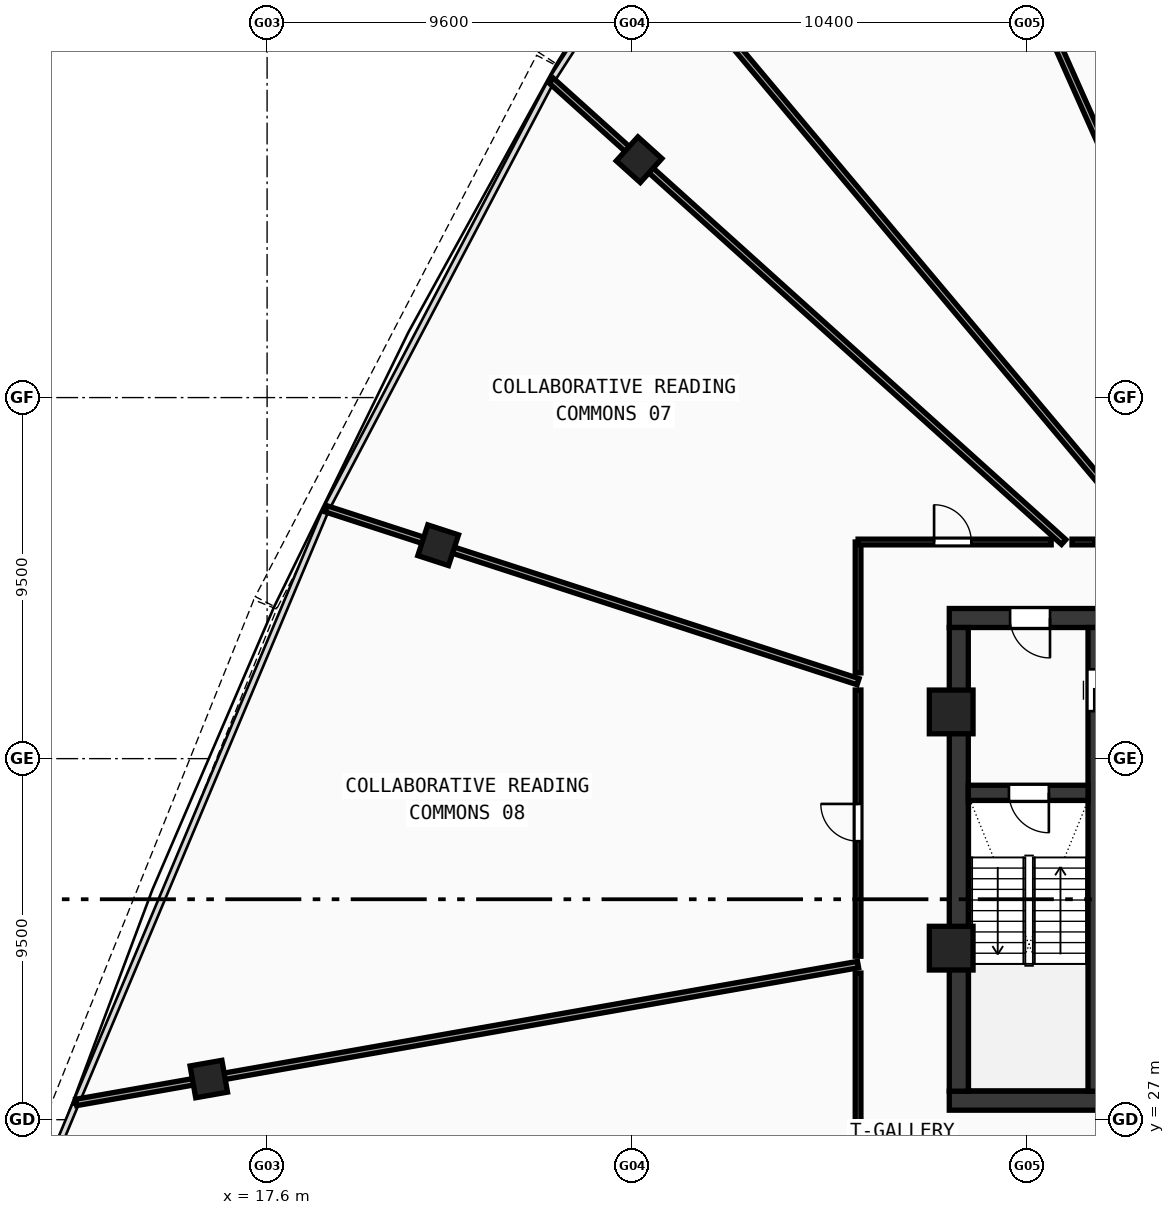
"""IFC4 building model, lengths in metres.
Left out: names, types, materials, properties, quantities, classifications, styles, units other than length and angle.
Written with IfcOpenShell. Run it as: python <this file> out.ifc"""

import sys

from ifc_helpers import new_model, si_unit, direction, frame, frame_2d, origin, origin_with_axes, origin_2d, place, context, subcontext, project, spatial, rectangle, hollow_rectangle, extrude, source, transform, mapped, element, fill, save


model = new_model("IFC4")
c1 = context("Model", 3, precision=1e-05, world=origin(), true_north=direction((0.0, 1.0)))
c2 = subcontext(c1, "Body", "Model", "MODEL_VIEW")
j1 = project(units=[si_unit("LENGTHUNIT", "METRE"), si_unit("PLANEANGLEUNIT", "RADIAN")], contexts=[c1])
p1 = place(None, origin())
s1 = spatial("IfcSite", under=j1, at=p1, CompositionType="ELEMENT")
p2 = place(p1, origin())
s2 = spatial("IfcBuilding", under=s1, at=p2, CompositionType="ELEMENT")
p3 = place(p2, frame((0.0, 0.0, 229.61)))
s3 = spatial("IfcBuildingStorey", under=s2, at=p3, CompositionType="ELEMENT", Elevation=229.61)
p4 = place(p3, frame((35.55, 27.5, 0.0), z_axis=(0.0, 0.0, 1.0), x_axis=(1.0, 0.0, 0.0)))
e1 = element("IfcWall", 1, at=p4, inside=s3, PredefinedType="SHEAR", context=c2, shape_type="SweptSolid", body=[
    extrude(rectangle(XDim=24.9, YDim=0.5, at=frame_2d((12.45, 0.0))), origin(), (0.0, 0.0, 1.0), 3.47),
])
p5 = place(p3, frame((35.55, 40.2, 0.0), z_axis=(0.0, 0.0, 1.0), x_axis=(1.0, 0.0, 0.0)))
e2 = element("IfcWall", 2, at=p5, inside=s3, PredefinedType="SHEAR", context=c2, shape_type="SweptSolid", body=[
    extrude(rectangle(XDim=11.25, YDim=0.5, at=frame_2d((5.625, 0.0))), origin(), (0.0, 0.0, 1.0), 3.47),
])
p6 = place(p5, frame((1.6, 0.0, 0.0)))
e3 = element("IfcOpeningElement", 3, at=p6, cuts=e2, PredefinedType="OPENING", context=c2, shape_type="SweptSolid", body=[
    extrude(rectangle(XDim=1.05, YDim=2.1, at=frame_2d((0.525, 1.05))), frame((0.0, 0.26, 0.0), z_axis=(0.0, -1.0, 0.0), x_axis=(1.0, 0.0, 0.0)), (0.0, 0.0, 1.0), 0.52),
])
p7 = place(p3, frame((35.8, 27.75, 0.0), z_axis=(0.0, 0.0, 1.0), x_axis=(0.0, 1.0, 0.0)))
e4 = element("IfcWall", 4, at=p7, inside=s3, PredefinedType="SHEAR", context=c2, shape_type="SweptSolid", body=[
    extrude(rectangle(XDim=12.2, YDim=0.5, at=frame_2d((6.1, 0.0))), origin(), (0.0, 0.0, 1.0), 3.47),
])
p8 = place(p3, frame((39.4, 27.75, 0.0), z_axis=(0.0, 0.0, 1.0), x_axis=(0.0, 1.0, 0.0)))
e5 = element("IfcWall", 5, at=p8, inside=s3, PredefinedType="SHEAR", context=c2, shape_type="SweptSolid", body=[
    extrude(rectangle(XDim=12.2, YDim=0.4, at=frame_2d((6.1, 0.0))), origin(), (0.0, 0.0, 1.0), 3.47),
])
p9 = place(p8, frame((10.0, 0.0, 0.0)))
e6 = element("IfcOpeningElement", 6, at=p9, cuts=e5, PredefinedType="OPENING", context=c2, shape_type="SweptSolid", body=[
    extrude(rectangle(XDim=1.1, YDim=2.1, at=frame_2d((0.55, 1.05))), frame((0.0, 0.21, 0.0), z_axis=(0.0, -1.0, 0.0), x_axis=(1.0, 0.0, 0.0)), (0.0, 0.0, 1.0), 0.42),
])
p10 = place(p3, frame((36.05, 35.6, 0.0), z_axis=(0.0, 0.0, 1.0), x_axis=(1.0, 0.0, 0.0)))
e7 = element("IfcWall", 7, at=p10, inside=s3, PredefinedType="SHEAR", context=c2, shape_type="SweptSolid", body=[
    extrude(rectangle(XDim=3.15, YDim=0.4, at=frame_2d((1.575, 0.0))), origin(), (0.0, 0.0, 1.0), 3.47),
])
p11 = place(p10, frame((1.07, 0.0, 0.0)))
e8 = element("IfcOpeningElement", 8, at=p11, cuts=e7, PredefinedType="OPENING", context=c2, shape_type="SweptSolid", body=[
    extrude(rectangle(XDim=1.05, YDim=2.1, at=frame_2d((0.525, 1.05))), frame((0.0, 0.21, 0.0), z_axis=(0.0, -1.0, 0.0), x_axis=(1.0, 0.0, 0.0)), (0.0, 0.0, 1.0), 0.42),
])
m1 = source(origin(), c2, "Body", "SweptSolid", [
    extrude(hollow_rectangle(XDim=1.15, YDim=1.15, WallThickness=0.048, at=origin_2d()), origin(), (0.0, 0.0, 1.0), 3.73),
])
for number, where, z_axis, x_axis in (
    (9, (35.6, 37.729, -0.26), (0.0, 0.0, 1.0), (1.0, 0.0, 0.0)),
    (10, (35.6, 31.513, -0.26), (0.0, 0.0, 1.0), (1.0, 0.0, 0.0)),
):
    element("IfcColumn", number, at=place(p3, frame(where, z_axis=z_axis, x_axis=x_axis)), inside=s3, PredefinedType="COLUMN", context=c2, shape_type="MappedRepresentation", body=[
        mapped(m1, transform((0.0, 0.0, 0.0), scale=1.0)),
    ])
m2 = source(origin(), c2, "Body", "SweptSolid", [
    extrude(hollow_rectangle(XDim=0.85, YDim=0.85, WallThickness=0.034, at=origin_2d()), origin(), (0.0, 0.0, 1.0), 3.73),
])
for number, where, z_axis, x_axis in (
    (11, (27.388, 52.259, -0.26), (0.0, 0.0, 1.0), (-0.669, -0.743, 0.0)),
    (12, (22.102, 42.115, -0.26), (0.0, 0.0, 1.0), (-0.309, -0.951, 0.0)),
    (13, (16.066, 28.069, -0.26), (0.0, 0.0, 1.0), (0.174, -0.985, 0.0)),
):
    element("IfcColumn", number, at=place(p3, frame(where, z_axis=z_axis, x_axis=x_axis)), inside=s3, PredefinedType="COLUMN", context=c2, shape_type="MappedRepresentation", body=[
        mapped(m2, transform((0.0, 0.0, 0.0), scale=1.0)),
    ])
p12 = place(p3, frame((42.702, 45.6, 0.0), z_axis=(0.0, 0.0, 1.0), x_axis=(-0.406743256781, 0.913542513003, 0.0)))
e14 = element("IfcWall", 14, at=p12, inside=s3, PredefinedType="PARTITIONING", context=c2, shape_type="SweptSolid", body=[
    extrude(rectangle(XDim=23.368, YDim=0.17, at=frame_2d((11.684, 0.0))), origin(), (0.0, 0.0, 1.0), 2.82),
])
p13 = place(p3, frame((39.6, 43.711, 0.0), z_axis=(0.0, 0.0, 1.0), x_axis=(-0.642791950905, 0.766040800383, 0.0)))
e15 = element("IfcWall", 15, at=p13, inside=s3, PredefinedType="PARTITIONING", context=c2, shape_type="SweptSolid", body=[
    extrude(rectangle(XDim=18.806, YDim=0.17, at=frame_2d((9.403, 0.0))), origin(), (0.0, 0.0, 1.0), 2.82),
])
p14 = place(p3, frame((38.56, 42.2, 0.0), z_axis=(0.0, 0.0, 1.0), x_axis=(-0.743147575456, 0.669127552185, 0.0)))
e16 = element("IfcWall", 16, at=p14, inside=s3, PredefinedType="PARTITIONING", context=c2, shape_type="SweptSolid", body=[
    extrude(rectangle(XDim=18.141, YDim=0.17, at=frame_2d((9.07, 0.0))), origin(), (0.0, 0.0, 1.0), 2.82),
])
p15 = place(p3, frame((33.15, 38.525, 0.0), z_axis=(0.0, 0.0, 1.0), x_axis=(-0.951058452106, 0.309011036497, 0.0)))
e17 = element("IfcWall", 17, at=p15, inside=s3, PredefinedType="PARTITIONING", context=c2, shape_type="SweptSolid", body=[
    extrude(rectangle(XDim=14.714, YDim=0.17, at=frame_2d((7.357, 0.0))), origin(), (0.0, 0.0, 1.0), 2.82),
])
p16 = place(p3, frame((33.15, 31.082, 0.0), z_axis=(0.0, 0.0, 1.0), x_axis=(-0.984808138799, -0.17364598975, 0.0)))
e18 = element("IfcWall", 18, at=p16, inside=s3, PredefinedType="PARTITIONING", context=c2, shape_type="SweptSolid", body=[
    extrude(rectangle(XDim=20.89, YDim=0.17, at=frame_2d((10.445, 0.0))), origin(), (0.0, 0.0, 1.0), 2.82),
])
p17 = place(p3, frame((33.15, 24.9, 0.0), z_axis=(0.0, 0.0, 1.0), x_axis=(0.0, 1.0, 0.0)))
e19 = element("IfcWall", 19, at=p17, inside=s3, PredefinedType="PARTITIONING", context=c2, shape_type="SweptSolid", body=[
    extrude(rectangle(XDim=5.958, YDim=0.15, at=frame_2d((2.979, 0.0))), origin(), (0.0, 0.0, 1.0), 3.12),
])
p18 = place(p3, frame((33.15, 31.301, 0.0), z_axis=(0.0, 0.0, 1.0), x_axis=(0.0, 1.0, 0.0)))
e20 = element("IfcWall", 20, at=p18, inside=s3, PredefinedType="PARTITIONING", context=c2, shape_type="SweptSolid", body=[
    extrude(rectangle(XDim=7.004, YDim=0.15, at=frame_2d((3.502, 0.0))), origin(), (0.0, 0.0, 1.0), 3.47),
])
p19 = place(p18, frame((3.027, 0.0, 0.0)))
e21 = element("IfcOpeningElement", 21, at=p19, cuts=e20, PredefinedType="OPENING", context=c2, shape_type="SweptSolid", body=[
    extrude(rectangle(XDim=0.98, YDim=2.12, at=frame_2d((0.49, 1.06))), frame((0.0, 0.085, 0.0), z_axis=(0.0, -1.0, 0.0), x_axis=(1.0, 0.0, 0.0)), (0.0, 0.0, 1.0), 0.17),
])
p20 = place(p3, frame((33.15, 38.756, 0.0), z_axis=(0.0, 0.0, 1.0), x_axis=(0.0, 1.0, 0.0)))
e22 = element("IfcWall", 22, at=p20, inside=s3, PredefinedType="PARTITIONING", context=c2, shape_type="SweptSolid", body=[
    extrude(rectangle(XDim=3.444, YDim=0.15, at=frame_2d((1.722, 0.0))), origin(), (0.0, 0.0, 1.0), 3.12),
])
p21 = place(p3, frame((33.15, 42.2, 0.0), z_axis=(0.0, 0.0, 1.0), x_axis=(1.0, 0.0, 0.0)))
e23 = element("IfcWall", 23, at=p21, inside=s3, PredefinedType="PARTITIONING", context=c2, shape_type="SweptSolid", body=[
    extrude(rectangle(XDim=5.081, YDim=0.15, at=frame_2d((2.541, 0.0))), origin(), (0.0, 0.0, 1.0), 3.12),
])
p22 = place(p21, frame((2.0, 0.0, 0.0)))
e24 = element("IfcOpeningElement", 24, at=p22, cuts=e23, PredefinedType="OPENING", context=c2, shape_type="SweptSolid", body=[
    extrude(rectangle(XDim=0.98, YDim=2.12, at=frame_2d((0.49, 1.06))), frame((0.0, 0.085, 0.0), z_axis=(0.0, -1.0, 0.0), x_axis=(1.0, 0.0, 0.0)), (0.0, 0.0, 1.0), 0.17),
])
p23 = place(p3, frame((38.78, 42.2, 0.0), z_axis=(0.0, 0.0, 1.0), x_axis=(1.0, 0.0, 0.0)))
e25 = element("IfcWall", 25, at=p23, inside=s3, PredefinedType="PARTITIONING", context=c2, shape_type="SweptSolid", body=[
    extrude(rectangle(XDim=0.6, YDim=0.15, at=frame_2d((0.3, 0.0))), origin(), (0.0, 0.0, 1.0), 2.82),
])
m3 = source(origin(), c2, "Body", "SweptSolid", [
    extrude(rectangle(XDim=1.05, YDim=2.1, at=frame_2d((0.525, 1.05))), frame((0.0, 0.025, 0.0), z_axis=(0.0, -1.0, 0.0), x_axis=(1.0, 0.0, 0.0)), (0.0, 0.0, 1.0), 0.05),
])
p24 = place(p11, frame((1.05, 0.0, 0.0), z_axis=(0.0, 0.0, 1.0), x_axis=(-1.0, 0.0, 0.0)))
e26 = element("IfcDoor", 26, at=p24, inside=s3, OperationType="SINGLE_SWING_LEFT", PredefinedType="DOOR", context=c2, shape_type="MappedRepresentation", body=[
    mapped(m3, transform((0.0, 0.0, 0.0), scale=1.0)),
])
fill(e8, e26)
p25 = place(p6, frame((1.05, 0.0, 0.0), z_axis=(0.0, 0.0, 1.0), x_axis=(-1.0, 0.0, 0.0)))
e27 = element("IfcDoor", 27, at=p25, inside=s3, OperationType="SINGLE_SWING_LEFT", PredefinedType="DOOR", context=c2, shape_type="MappedRepresentation", body=[
    mapped(m3, transform((0.0, 0.0, 0.0), scale=1.0)),
])
fill(e3, e27)
m4 = source(origin(), c2, "Body", "SweptSolid", [
    extrude(rectangle(XDim=1.1, YDim=2.1, at=frame_2d((0.55, 1.05))), frame((0.0, 0.025, 0.0), z_axis=(0.0, -1.0, 0.0), x_axis=(1.0, 0.0, 0.0)), (0.0, 0.0, 1.0), 0.05),
])
p26 = place(p9, frame((1.1, 0.0, 0.0), z_axis=(0.0, 0.0, 1.0), x_axis=(-1.0, 0.0, 0.0)))
e28 = element("IfcDoor", 28, at=p26, inside=s3, OperationType="DOUBLE_DOOR_SLIDING", PredefinedType="DOOR", context=c2, shape_type="MappedRepresentation", body=[
    mapped(m4, transform((0.0, 0.0, 0.0), scale=1.0)),
])
fill(e6, e28)
m5 = source(origin(), c2, "Body", "SweptSolid", [
    extrude(rectangle(XDim=0.98, YDim=2.12, at=frame_2d((0.49, 1.06))), frame((0.0, 0.025, 0.0), z_axis=(0.0, -1.0, 0.0), x_axis=(1.0, 0.0, 0.0)), (0.0, 0.0, 1.0), 0.05),
])
p27 = place(p22, origin_with_axes())
e29 = element("IfcDoor", 29, at=p27, inside=s3, OperationType="SINGLE_SWING_LEFT", PredefinedType="DOOR", context=c2, shape_type="MappedRepresentation", body=[
    mapped(m5, transform((0.0, 0.0, 0.0), scale=1.0)),
])
fill(e24, e29)
p28 = place(p19, origin_with_axes())
e30 = element("IfcDoor", 30, at=p28, inside=s3, OperationType="SINGLE_SWING_RIGHT", PredefinedType="DOOR", context=c2, shape_type="MappedRepresentation", body=[
    mapped(m5, transform((0.0, 0.0, 0.0), scale=1.0)),
])
fill(e21, e30)
save(model, sys.argv[1])
